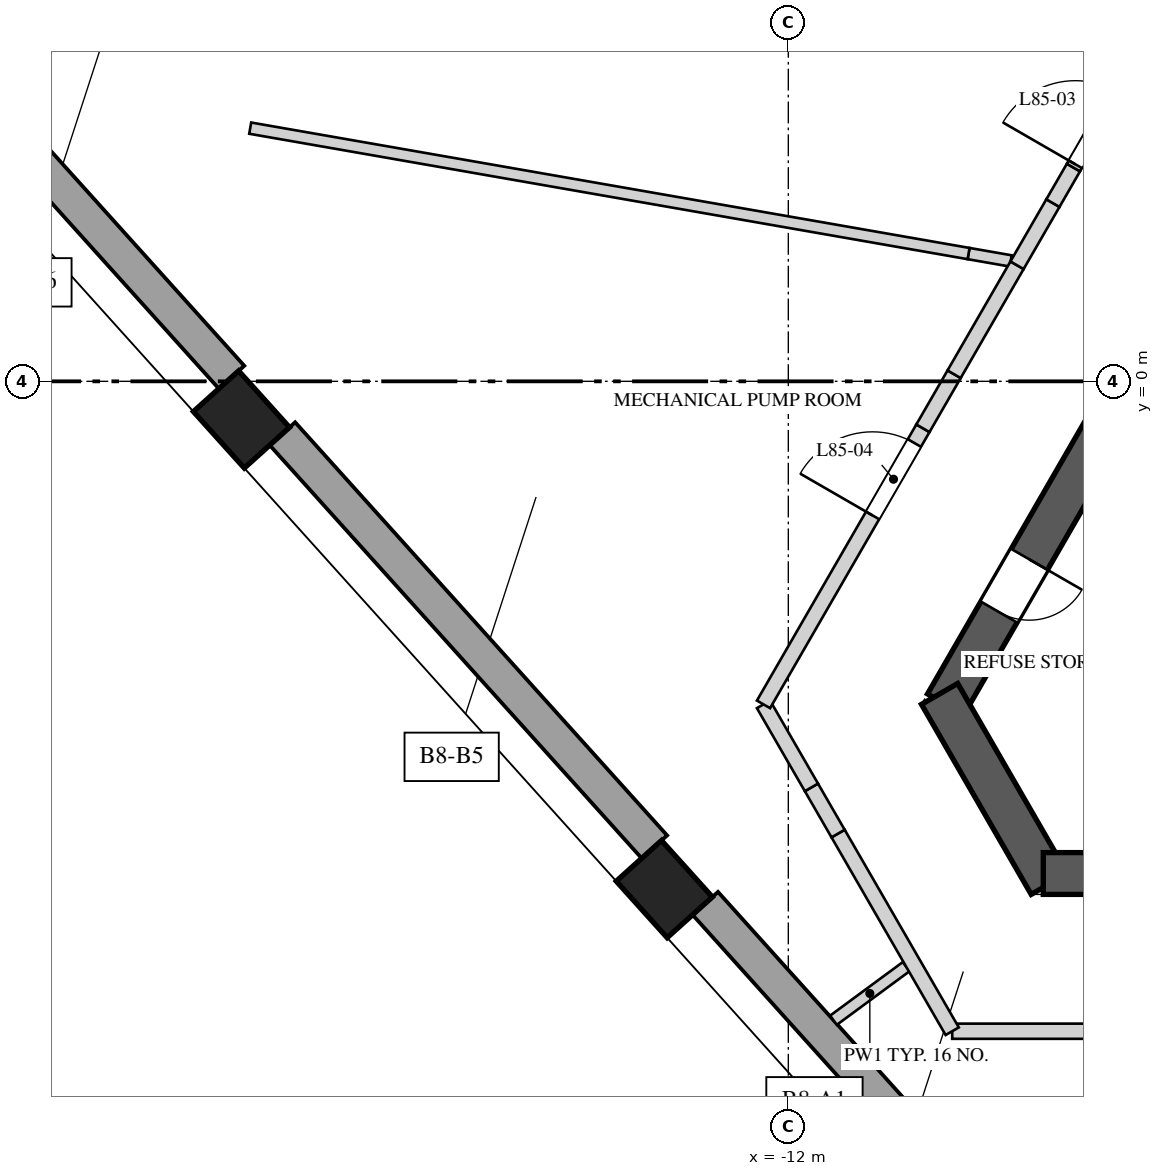
"""IFC4 building model, lengths in metres.
Left out: names, types, materials, properties, quantities, classifications, styles, units other than length and angle.
Written with IfcOpenShell. Run it as: python <this file> out.ifc"""

import sys

from ifc_helpers import new_model, si_unit, direction, frame, frame_2d, origin, origin_2d, place, context, subcontext, project, spatial, polyline, rectangle, outline, extrude, element, fill, save


model = new_model("IFC4")
c1 = context("Model", 3, precision=1e-05, world=origin(), true_north=direction((0.0, 1.0)))
c2 = subcontext(c1, "Body", "Model", "MODEL_VIEW")
j1 = project(units=[si_unit("LENGTHUNIT", "METRE"), si_unit("PLANEANGLEUNIT", "RADIAN")], contexts=[c1])
p1 = place(None, origin())
s1 = spatial("IfcSite", under=j1, at=p1, CompositionType="ELEMENT")
p2 = place(p1, origin())
s2 = spatial("IfcBuilding", under=s1, at=p2, CompositionType="ELEMENT")
p3 = place(p2, frame((0.0, 0.0, 370.4)))
s3 = spatial("IfcBuildingStorey", under=s2, at=p3, CompositionType="ELEMENT", Elevation=370.4)
p4 = place(p3, frame((-1.285, 10.725, 0.0), z_axis=(0.0, 0.0, 1.0), x_axis=(-0.499994590896, -0.86602852671, 0.0)))
e1 = element("IfcWall", 1, at=p4, inside=s3, PredefinedType="SHEAR", context=c2, shape_type="SweptSolid", body=[
    extrude(rectangle(XDim=17.292, YDim=0.55, at=frame_2d((8.646, 0.0))), origin(), (0.0, 0.0, 1.0), 4.5),
])
p5 = place(p4, frame((6.851, 0.0, 0.0)))
e2 = element("IfcOpeningElement", 2, at=p5, cuts=e1, PredefinedType="OPENING", context=c2, shape_type="SweptSolid", body=[
    extrude(rectangle(XDim=1.0, YDim=2.4, at=frame_2d((0.5, 1.2))), frame((0.0, 0.285, 0.0), z_axis=(0.0, -1.0, 0.0), x_axis=(1.0, 0.0, 0.0)), (0.0, 0.0, 1.0), 0.57),
])
p6 = place(p4, frame((15.089, 0.0, 0.0)))
e3 = element("IfcOpeningElement", 3, at=p6, cuts=e1, PredefinedType="OPENING", context=c2, shape_type="SweptSolid", body=[
    extrude(rectangle(XDim=0.8, YDim=2.1, at=frame_2d((0.4, 1.05))), frame((0.0, 0.285, 0.0), z_axis=(0.0, -1.0, 0.0), x_axis=(1.0, 0.0, 0.0)), (0.0, 0.0, 1.0), 0.57),
])
p7 = place(p3, frame((-10.01, -4.113, 0.0), z_axis=(0.0, 0.0, 1.0), x_axis=(0.499995765644, -0.866027848477, 0.0)))
e4 = element("IfcWall", 4, at=p7, inside=s3, PredefinedType="SHEAR", context=c2, shape_type="SweptSolid", body=[
    extrude(rectangle(XDim=2.887, YDim=0.55, at=frame_2d((1.443, 0.0))), origin(), (0.0, 0.0, 1.0), 4.5),
])
p8 = place(p3, frame((-8.646, -6.475, 0.0), z_axis=(0.0, 0.0, 1.0), x_axis=(1.0, 0.0, 0.0)))
e5 = element("IfcWall", 5, at=p8, inside=s3, PredefinedType="SHEAR", context=c2, shape_type="SweptSolid", body=[
    extrude(rectangle(XDim=17.292, YDim=0.55, at=frame_2d((8.646, 0.0))), origin(), (0.0, 0.0, 1.0), 4.5),
])
p9 = place(p8, frame((6.851, 0.0, 0.0)))
e6 = element("IfcOpeningElement", 6, at=p9, cuts=e5, PredefinedType="OPENING", context=c2, shape_type="SweptSolid", body=[
    extrude(rectangle(XDim=1.0, YDim=2.4, at=frame_2d((0.5, 1.2))), frame((0.0, 0.285, 0.0), z_axis=(0.0, -1.0, 0.0), x_axis=(1.0, 0.0, 0.0)), (0.0, 0.0, 1.0), 0.57),
])
p10 = place(p8, frame((15.089, 0.0, 0.0)))
e7 = element("IfcOpeningElement", 7, at=p10, cuts=e5, PredefinedType="OPENING", context=c2, shape_type="SweptSolid", body=[
    extrude(rectangle(XDim=0.8, YDim=2.1, at=frame_2d((0.4, 1.05))), frame((0.0, 0.285, 0.0), z_axis=(0.0, -1.0, 0.0), x_axis=(1.0, 0.0, 0.0)), (0.0, 0.0, 1.0), 0.57),
])
for number, where, z_axis, x_axis in (
    (8, (-19.195, -0.502, 0.0), (0.0, 0.0, 1.0), (0.669, -0.743, 0.0)),
    (9, (-13.631, -6.68, 0.0), (0.0, 0.0, 1.0), (0.669, -0.743, 0.0)),
):
    element("IfcColumn", number, at=place(p3, frame(where, z_axis=z_axis, x_axis=x_axis)), inside=s3, PredefinedType="COLUMN", context=c2, shape_type="SweptSolid", body=[
        extrude(rectangle(XDim=1.0, YDim=0.8, at=origin_2d()), origin(), (0.0, 0.0, 1.0), 4.5),
    ])
p11 = place(p3, frame((-23.817, 5.043, 0.0), z_axis=(0.0, 0.0, 1.0), x_axis=(0.669137493687, -0.743138624041, 0.0)))
e10 = element("IfcWall", 10, at=p11, inside=s3, PredefinedType="SOLIDWALL", context=c2, shape_type="SweptSolid", body=[
    extrude(rectangle(XDim=6.714, YDim=0.45, at=frame_2d((3.357, 0.0))), origin(), (0.0, 0.0, 1.0), 3.8),
])
p12 = place(p3, frame((-18.656, -0.689, 0.0), z_axis=(0.0, 0.0, 1.0), x_axis=(0.669117789535, -0.743156365598, 0.0)))
e11 = element("IfcWall", 11, at=p12, inside=s3, PredefinedType="SOLIDWALL", context=c2, shape_type="SweptSolid", body=[
    extrude(rectangle(XDim=7.314, YDim=0.45, at=frame_2d((3.657, 0.0))), origin(), (0.0, 0.0, 1.0), 3.8),
])
p13 = place(p3, frame((-13.093, -6.868, 0.0), z_axis=(0.0, 0.0, 1.0), x_axis=(0.669136224502, -0.74313976684, 0.0)))
e12 = element("IfcWall", 12, at=p13, inside=s3, PredefinedType="SOLIDWALL", context=c2, shape_type="SweptSolid", body=[
    extrude(rectangle(XDim=7.314, YDim=0.45, at=frame_2d((3.657, 0.0))), origin(), (0.0, 0.0, 1.0), 3.8),
])
p14 = place(p3, frame((-10.45, -7.701, 0.0), z_axis=(0.0, 0.0, 1.0), x_axis=(-0.805029994767, -0.593234108532, 0.0)))
e13 = element("IfcWall", 13, at=p14, inside=s3, PredefinedType="PARTITIONING", context=c2, shape_type="SweptSolid", body=[
    extrude(rectangle(XDim=1.187, YDim=0.15, at=frame_2d((0.594, 0.0))), origin(), (0.0, 0.0, 1.0), 4.15),
])
p15 = place(p3, frame((-9.074, 1.584, 0.0), z_axis=(0.0, 0.0, 1.0), x_axis=(-0.985074607055, 0.172127913293, 0.0)))
e14 = element("IfcWall", 14, at=p15, inside=s3, PredefinedType="PARTITIONING", context=c2, shape_type="SweptSolid", body=[
    extrude(rectangle(XDim=0.563, YDim=0.15, at=frame_2d((0.281, 0.0))), origin(), (0.0, 0.0, 1.0), 3.05),
])
p16 = place(p3, frame((-9.628, 1.681, 0.0), z_axis=(0.0, 0.0, 1.0), x_axis=(-0.985101356033, 0.171974760768, 0.0)))
e15 = element("IfcWall", 15, at=p16, inside=s3, PredefinedType="PARTITIONING", context=c2, shape_type="SweptSolid", body=[
    extrude(rectangle(XDim=9.594, YDim=0.15, at=frame_2d((4.797, 0.0))), origin(), (0.0, 0.0, 1.0), 4.15),
])
p17 = place(p3, frame((-5.935, -8.55, 0.0), z_axis=(0.0, 0.0, 1.0), x_axis=(-1.0, 0.0, 0.0)))
e16 = element("IfcWall", 16, at=p17, inside=s3, PredefinedType="SOLIDWALL", context=c2, shape_type="SweptSolid", body=[
    extrude(rectangle(XDim=3.909, YDim=0.2, at=frame_2d((1.955, 0.0))), origin(), (0.0, 0.0, 1.0), 4.15),
])
p18 = place(p3, frame((-9.844, -8.55, 0.0), z_axis=(0.0, 0.0, 1.0), x_axis=(-0.500003959331, 0.866023117852, 0.0)))
e17 = element("IfcWall", 17, at=p18, inside=s3, PredefinedType="SOLIDWALL", context=c2, shape_type="SweptSolid", body=[
    extrude(rectangle(XDim=3.003, YDim=0.2, at=frame_2d((1.501, 0.0))), origin(), (0.0, 0.0, 1.0), 4.15),
])
p19 = place(p3, frame((-11.345, -5.949, 0.0), z_axis=(0.0, 0.0, 1.0), x_axis=(-0.499993523031, 0.866029143232, 0.0)))
e18 = element("IfcWall", 18, at=p19, inside=s3, PredefinedType="SOLIDWALL", context=c2, shape_type="SweptSolid", body=[
    extrude(rectangle(XDim=0.702, YDim=0.2, at=frame_2d((0.351, 0.0))), origin(), (0.0, 0.0, 1.0), 3.45),
])
p20 = place(p3, frame((-11.696, -5.342, 0.0), z_axis=(0.0, 0.0, 1.0), x_axis=(-0.500013012896, 0.866017890655, 0.0)))
e19 = element("IfcWall", 19, at=p20, inside=s3, PredefinedType="SOLIDWALL", context=c2, shape_type="SweptSolid", body=[
    extrude(rectangle(XDim=1.261, YDim=0.2, at=frame_2d((0.63, 0.0))), origin(), (0.0, 0.0, 1.0), 4.15),
])
p21 = place(p3, frame((-12.326, -4.25, 0.0), z_axis=(0.0, 0.0, 1.0), x_axis=(0.499982771656, 0.866035350345, 0.0)))
e20 = element("IfcWall", 20, at=p21, inside=s3, PredefinedType="SOLIDWALL", context=c2, shape_type="SweptSolid", body=[
    extrude(rectangle(XDim=4.195, YDim=0.2, at=frame_2d((2.097, 0.0))), origin(), (0.0, 0.0, 1.0), 4.15),
])
p22 = place(p21, frame((2.87, 0.0, 0.0)))
e21 = element("IfcOpeningElement", 21, at=p22, cuts=e20, PredefinedType="OPENING", context=c2, shape_type="SweptSolid", body=[
    extrude(rectangle(XDim=1.1, YDim=2.4, at=frame_2d((0.55, 1.2))), frame((0.0, 0.11, 0.0), z_axis=(0.0, -1.0, 0.0), x_axis=(1.0, 0.0, 0.0)), (0.0, 0.0, 1.0), 0.22),
])
p23 = place(p3, frame((-10.229, -0.617, 0.0), z_axis=(0.0, 0.0, 1.0), x_axis=(0.5001686003, 0.865928040471, 0.0)))
e22 = element("IfcWall", 22, at=p23, inside=s3, PredefinedType="SOLIDWALL", context=c2, shape_type="SweptSolid", body=[
    extrude(rectangle(XDim=0.821, YDim=0.2, at=frame_2d((0.411, 0.0))), origin(), (0.0, 0.0, 1.0), 3.45),
])
p24 = place(p3, frame((-9.819, 0.094, 0.0), z_axis=(0.0, 0.0, 1.0), x_axis=(0.49997779057, 0.866038226025, 0.0)))
e23 = element("IfcWall", 23, at=p24, inside=s3, PredefinedType="SOLIDWALL", context=c2, shape_type="SweptSolid", body=[
    extrude(rectangle(XDim=1.655, YDim=0.2, at=frame_2d((0.828, 0.0))), origin(), (0.0, 0.0, 1.0), 4.15),
])
p25 = place(p3, frame((-8.991, 1.527, 0.0), z_axis=(0.0, 0.0, 1.0), x_axis=(0.500006071987, 0.866021898093, 0.0)))
e24 = element("IfcWall", 24, at=p25, inside=s3, PredefinedType="SOLIDWALL", context=c2, shape_type="SweptSolid", body=[
    extrude(rectangle(XDim=0.944, YDim=0.2, at=frame_2d((0.472, 0.0))), origin(), (0.0, 0.0, 1.0), 3.05),
])
p26 = place(p3, frame((-8.519, 2.344, 0.0), z_axis=(0.0, 0.0, 1.0), x_axis=(0.499931139538, 0.866065156741, 0.0)))
e25 = element("IfcWall", 25, at=p26, inside=s3, PredefinedType="SOLIDWALL", context=c2, shape_type="SweptSolid", body=[
    extrude(rectangle(XDim=0.54, YDim=0.2, at=frame_2d((0.27, 0.0))), origin(), (0.0, 0.0, 1.0), 4.15),
])
p27 = place(p3, frame((-8.249, 2.812, 0.0), z_axis=(0.0, 0.0, 1.0), x_axis=(0.500033551112, 0.866006032174, 0.0)))
e26 = element("IfcWall", 26, at=p27, inside=s3, PredefinedType="SOLIDWALL", context=c2, shape_type="SweptSolid", body=[
    extrude(outline(polyline([(0.0, 0.0), (1.2, 0.0), (1.2, 3.05), (0.267, 3.05), (0.267, 4.15), (0.0, 4.15), (0.0, 0.0)])), frame((0.0, 0.1, 0.0), z_axis=(0.0, -1.0, 0.0), x_axis=(1.0, 0.0, 0.0)), (0.0, 0.0, 1.0), 0.2),
])
p28 = place(p27, frame((0.05, 0.0, 0.0)))
e27 = element("IfcOpeningElement", 27, at=p28, cuts=e26, PredefinedType="OPENING", context=c2, shape_type="SweptSolid", body=[
    extrude(rectangle(XDim=1.1, YDim=2.4, at=frame_2d((0.55, 1.2))), frame((0.0, 0.11, 0.0), z_axis=(0.0, -1.0, 0.0), x_axis=(1.0, 0.0, 0.0)), (0.0, 0.0, 1.0), 0.22),
])
p29 = place(p6, origin())
e28 = element("IfcDoor", 28, at=p29, inside=s3, OperationType="SINGLE_SWING_LEFT", PredefinedType="DOOR", context=c2, shape_type="SweptSolid", body=[
    extrude(rectangle(XDim=0.8, YDim=2.1, at=frame_2d((0.4, 1.05))), frame((0.0, 0.025, 0.0), z_axis=(0.0, -1.0, 0.0), x_axis=(1.0, 0.0, 0.0)), (0.0, 0.0, 1.0), 0.05),
])
fill(e3, e28)
p30 = place(p28, origin())
e29 = element("IfcDoor", 29, at=p30, inside=s3, OperationType="SINGLE_SWING_LEFT", PredefinedType="DOOR", context=c2, shape_type="SweptSolid", body=[
    extrude(rectangle(XDim=1.1, YDim=2.4, at=frame_2d((0.55, 1.2))), frame((0.0, 0.025, 0.0), z_axis=(0.0, -1.0, 0.0), x_axis=(1.0, 0.0, 0.0)), (0.0, 0.0, 1.0), 0.05),
])
fill(e27, e29)
p31 = place(p22, origin())
e30 = element("IfcDoor", 30, at=p31, inside=s3, OperationType="SINGLE_SWING_RIGHT", PredefinedType="DOOR", context=c2, shape_type="SweptSolid", body=[
    extrude(rectangle(XDim=1.1, YDim=2.4, at=frame_2d((0.55, 1.2))), frame((0.0, 0.025, 0.0), z_axis=(0.0, -1.0, 0.0), x_axis=(1.0, 0.0, 0.0)), (0.0, 0.0, 1.0), 0.05),
])
fill(e21, e30)
save(model, sys.argv[1])
